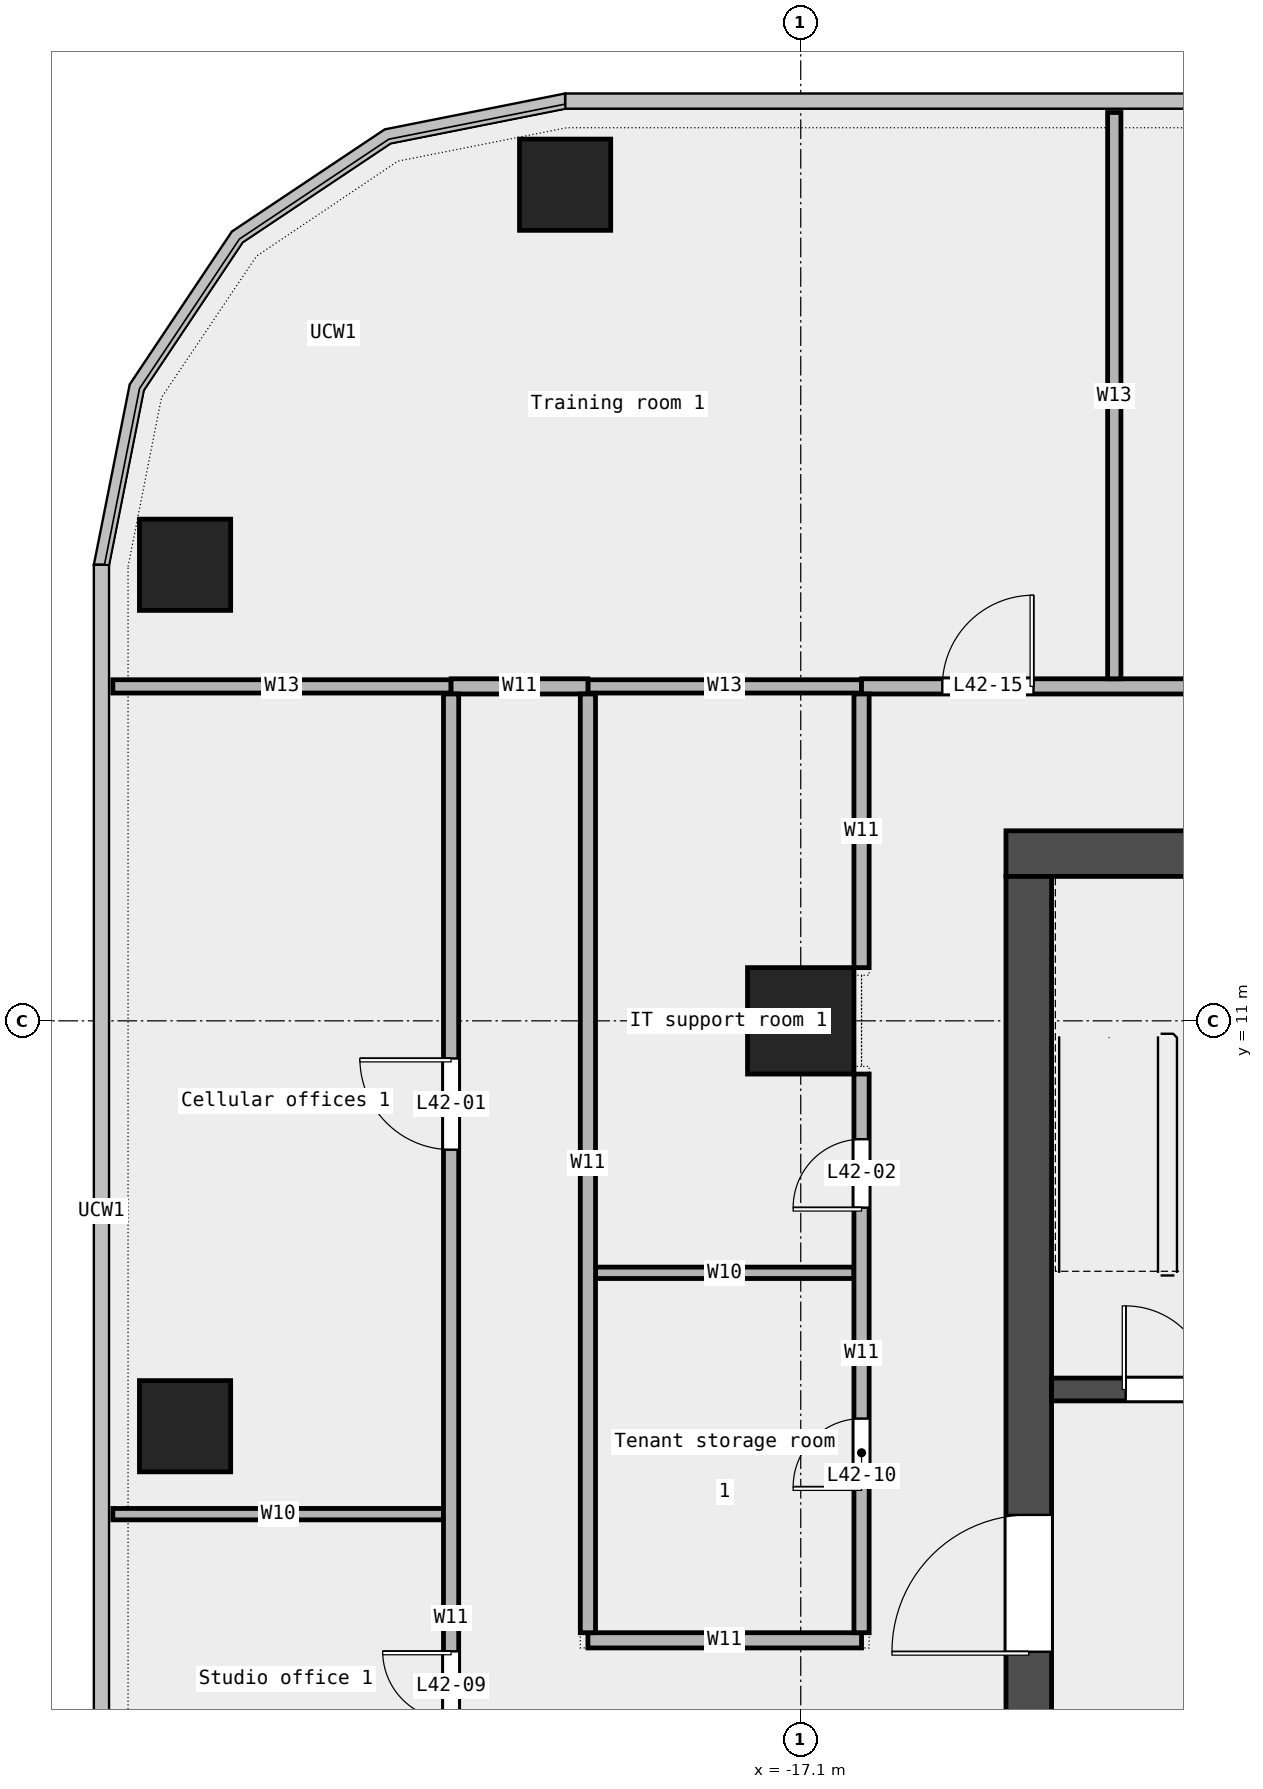
"""IFC4 building model, lengths in metres.
Left out: names, types, materials, properties, quantities, classifications, styles, units other than length and angle.
Written with IfcOpenShell. Run it as: python <this file> out.ifc"""

import sys

from ifc_helpers import new_model, si_unit, direction, frame, frame_2d, origin, origin_2d, place, context, subcontext, project, spatial, rectangle, extrude, element, fill, save


model = new_model("IFC4")
c1 = context("Model", 3, precision=1e-05, world=origin(), true_north=direction((0.0, 1.0)))
c2 = subcontext(c1, "Body", "Model", "MODEL_VIEW")
j1 = project(units=[si_unit("LENGTHUNIT", "METRE"), si_unit("PLANEANGLEUNIT", "RADIAN")], contexts=[c1])
p1 = place(None, origin())
s1 = spatial("IfcSite", under=j1, at=p1, CompositionType="ELEMENT")
p2 = place(p1, origin())
s2 = spatial("IfcBuilding", under=s1, at=p2, CompositionType="ELEMENT")
p3 = place(p2, frame((0.0, 0.0, 201.0)))
s3 = spatial("IfcBuildingStorey", under=s2, at=p3, CompositionType="ELEMENT", Elevation=201.0)
for number, where, z_axis, x_axis in (
    (1, (-20.2, 22.0, 0.0), (0.0, 0.0, 1.0), (1.0, 0.0, 0.0)),
    (2, (-25.2, 17.0, 0.0), (0.0, 0.0, 1.0), (1.0, 0.0, 0.0)),
    (3, (-25.2, 5.667, 0.0), (0.0, 0.0, 1.0), (1.0, 0.0, 0.0)),
):
    element("IfcColumn", number, at=place(p3, frame(where, z_axis=z_axis, x_axis=x_axis)), inside=s3, PredefinedType="COLUMN", context=c2, shape_type="SweptSolid", body=[
        extrude(rectangle(XDim=1.2, YDim=1.2, at=origin_2d()), origin(), (0.0, 0.0, 1.0), 3.4),
    ])
p4 = place(p3, frame((-17.1, 11.0, 0.0), z_axis=(0.0, 0.0, 1.0), x_axis=(1.0, 0.0, 0.0)))
e4 = element("IfcColumn", 4, at=p4, inside=s3, PredefinedType="COLUMN", context=c2, shape_type="SweptSolid", body=[
    extrude(rectangle(XDim=1.4, YDim=1.4, at=origin_2d()), origin(), (0.0, 0.0, 1.0), 3.4),
])
p5 = place(p3, frame((-19.9, 2.85, 0.0), z_axis=(0.0, 0.0, 1.0), x_axis=(1.0, 0.0, 0.0)))
e5 = element("IfcWall", 5, at=p5, inside=s3, PredefinedType="PARTITIONING", context=c2, shape_type="SweptSolid", body=[
    extrude(rectangle(XDim=3.6, YDim=0.2, at=frame_2d((1.8, 0.0))), origin(), (0.0, 0.0, 1.0), 3.4),
])
p6 = place(p3, frame((-26.15, 4.51, 0.0), z_axis=(0.0, 0.0, 1.0), x_axis=(1.0, 0.0, 0.0)))
e6 = element("IfcWall", 6, at=p6, inside=s3, PredefinedType="PARTITIONING", context=c2, shape_type="SweptSolid", body=[
    extrude(rectangle(XDim=4.35, YDim=0.15, at=frame_2d((2.175, 0.0))), origin(), (0.0, 0.0, 1.0), 3.4),
])
p7 = place(p3, frame((-19.8, 7.685, 0.0), z_axis=(0.0, 0.0, 1.0), x_axis=(1.0, 0.0, 0.0)))
e7 = element("IfcWall", 7, at=p7, inside=s3, PredefinedType="PARTITIONING", context=c2, shape_type="SweptSolid", body=[
    extrude(rectangle(XDim=3.4, YDim=0.15, at=frame_2d((1.7, 0.0))), origin(), (0.0, 0.0, 1.0), 3.4),
])
p8 = place(p3, frame((-26.15, 15.4, 0.0), z_axis=(0.0, 0.0, 1.0), x_axis=(1.0, 0.0, 0.0)))
e8 = element("IfcWall", 8, at=p8, inside=s3, PredefinedType="PARTITIONING", context=c2, shape_type="SweptSolid", body=[
    extrude(rectangle(XDim=4.45, YDim=0.175, at=frame_2d((2.225, 0.0))), origin(), (0.0, 0.0, 1.0), 3.4),
])
p9 = place(p3, frame((-19.9, 15.4, 0.0), z_axis=(0.0, 0.0, 1.0), x_axis=(1.0, 0.0, 0.0)))
e9 = element("IfcWall", 9, at=p9, inside=s3, PredefinedType="PARTITIONING", context=c2, shape_type="SweptSolid", body=[
    extrude(rectangle(XDim=3.6, YDim=0.175, at=frame_2d((1.8, 0.0))), origin(), (0.0, 0.0, 1.0), 3.4),
])
p10 = place(p3, frame((-21.7, 15.4, 0.0), z_axis=(0.0, 0.0, 1.0), x_axis=(1.0, 0.0, 0.0)))
e10 = element("IfcWall", 10, at=p10, inside=s3, PredefinedType="PARTITIONING", context=c2, shape_type="SweptSolid", body=[
    extrude(rectangle(XDim=1.8, YDim=0.2, at=frame_2d((0.9, 0.0))), origin(), (0.0, 0.0, 1.0), 3.4),
])
p11 = place(p3, frame((-16.3, 15.4, 0.0), z_axis=(0.0, 0.0, 1.0), x_axis=(1.0, 0.0, 0.0)))
e11 = element("IfcWall", 11, at=p11, inside=s3, PredefinedType="PARTITIONING", context=c2, shape_type="SweptSolid", body=[
    extrude(rectangle(XDim=32.6, YDim=0.2, at=frame_2d((16.3, 0.0))), origin(), (0.0, 0.0, 1.0), 3.4),
])
p12 = place(p11, frame((10.185, 0.0, 0.0)))
e12 = element("IfcOpeningElement", 12, at=p12, cuts=e11, PredefinedType="OPENING", context=c2, shape_type="SweptSolid", body=[
    extrude(rectangle(XDim=1.5, YDim=2.1, at=frame_2d((0.75, 1.05))), frame((0.0, 0.112, 0.0), z_axis=(0.0, -1.0, 0.0), x_axis=(1.0, 0.0, 0.0)), (0.0, 0.0, 1.0), 0.224),
])
p13 = place(p11, frame((1.062, 0.0, 0.0)))
e13 = element("IfcOpeningElement", 13, at=p13, cuts=e11, PredefinedType="OPENING", context=c2, shape_type="SweptSolid", body=[
    extrude(rectangle(XDim=1.2, YDim=2.1, at=frame_2d((0.6, 1.05))), frame((0.0, 0.112, 0.0), z_axis=(0.0, -1.0, 0.0), x_axis=(1.0, 0.0, 0.0)), (0.0, 0.0, 1.0), 0.224),
])
p14 = place(p11, frame((24.677, 0.0, 0.0)))
e14 = element("IfcOpeningElement", 14, at=p14, cuts=e11, PredefinedType="OPENING", context=c2, shape_type="SweptSolid", body=[
    extrude(rectangle(XDim=1.2, YDim=2.1, at=frame_2d((0.6, 1.05))), frame((0.0, 0.112, 0.0), z_axis=(0.0, -1.0, 0.0), x_axis=(1.0, 0.0, 0.0)), (0.0, 0.0, 1.0), 0.224),
])
p15 = place(p3, frame((-21.7, -9.0, 0.0), z_axis=(0.0, 0.0, 1.0), x_axis=(0.0, 1.0, 0.0)))
e15 = element("IfcWall", 15, at=p15, inside=s3, PredefinedType="PARTITIONING", context=c2, shape_type="SweptSolid", body=[
    extrude(rectangle(XDim=24.3, YDim=0.2, at=frame_2d((12.15, 0.0))), origin(), (0.0, 0.0, 1.0), 3.4),
])
p16 = place(p15, frame((18.305, 0.0, 0.0)))
e16 = element("IfcOpeningElement", 16, at=p16, cuts=e15, PredefinedType="OPENING", context=c2, shape_type="SweptSolid", body=[
    extrude(rectangle(XDim=1.2, YDim=2.1, at=frame_2d((0.6, 1.05))), frame((0.0, 0.112, 0.0), z_axis=(0.0, -1.0, 0.0), x_axis=(1.0, 0.0, 0.0)), (0.0, 0.0, 1.0), 0.224),
])
p17 = place(p15, frame((10.805, 0.0, 0.0)))
e17 = element("IfcOpeningElement", 17, at=p17, cuts=e15, PredefinedType="OPENING", context=c2, shape_type="SweptSolid", body=[
    extrude(rectangle(XDim=0.9, YDim=2.1, at=frame_2d((0.45, 1.05))), frame((0.0, 0.112, 0.0), z_axis=(0.0, -1.0, 0.0), x_axis=(1.0, 0.0, 0.0)), (0.0, 0.0, 1.0), 0.224),
])
p18 = place(p3, frame((-19.9, 2.95, 0.0), z_axis=(0.0, 0.0, 1.0), x_axis=(0.0, 1.0, 0.0)))
e18 = element("IfcWall", 18, at=p18, inside=s3, PredefinedType="PARTITIONING", context=c2, shape_type="SweptSolid", body=[
    extrude(rectangle(XDim=12.35, YDim=0.2, at=frame_2d((6.175, 0.0))), origin(), (0.0, 0.0, 1.0), 3.4),
])
p19 = place(p3, frame((-16.3, 2.95, 0.0), z_axis=(0.0, 0.0, 1.0), x_axis=(0.0, 1.0, 0.0)))
e19 = element("IfcWall", 19, at=p19, inside=s3, PredefinedType="PARTITIONING", context=c2, shape_type="SweptSolid", body=[
    extrude(rectangle(XDim=7.35, YDim=0.2, at=frame_2d((3.675, 0.0))), origin(), (0.0, 0.0, 1.0), 3.4),
])
p20 = place(p19, frame((5.593, 0.0, 0.0)))
e20 = element("IfcOpeningElement", 20, at=p20, cuts=e19, PredefinedType="OPENING", context=c2, shape_type="SweptSolid", body=[
    extrude(rectangle(XDim=0.9, YDim=2.1, at=frame_2d((0.45, 1.05))), frame((0.0, 0.112, 0.0), z_axis=(0.0, -1.0, 0.0), x_axis=(1.0, 0.0, 0.0)), (0.0, 0.0, 1.0), 0.224),
])
p21 = place(p19, frame((1.917, 0.0, 0.0)))
e21 = element("IfcOpeningElement", 21, at=p21, cuts=e19, PredefinedType="OPENING", context=c2, shape_type="SweptSolid", body=[
    extrude(rectangle(XDim=0.9, YDim=2.1, at=frame_2d((0.45, 1.05))), frame((0.0, 0.112, 0.0), z_axis=(0.0, -1.0, 0.0), x_axis=(1.0, 0.0, 0.0)), (0.0, 0.0, 1.0), 0.224),
])
p22 = place(p3, frame((-16.3, 11.7, 0.0), z_axis=(0.0, 0.0, 1.0), x_axis=(0.0, 1.0, 0.0)))
e22 = element("IfcWall", 22, at=p22, inside=s3, PredefinedType="PARTITIONING", context=c2, shape_type="SweptSolid", body=[
    extrude(rectangle(XDim=3.6, YDim=0.2, at=frame_2d((1.8, 0.0))), origin(), (0.0, 0.0, 1.0), 3.4),
])
p23 = place(p3, frame((-12.975, 15.5, 0.0), z_axis=(0.0, 0.0, 1.0), x_axis=(0.0, 1.0, 0.0)))
e23 = element("IfcWall", 23, at=p23, inside=s3, PredefinedType="PARTITIONING", context=c2, shape_type="SweptSolid", body=[
    extrude(rectangle(XDim=7.45, YDim=0.175, at=frame_2d((3.725, 0.0))), origin(), (0.0, 0.0, 1.0), 3.4),
])
p24 = place(p3, frame((-14.4, 13.2, 0.0), z_axis=(0.0, 0.0, 1.0), x_axis=(1.0, 0.0, 0.0)))
e24 = element("IfcWall", 24, at=p24, inside=s3, PredefinedType="SHEAR", context=c2, shape_type="SweptSolid", body=[
    extrude(rectangle(XDim=28.8, YDim=0.6, at=frame_2d((14.4, 0.0))), origin(), (0.0, 0.0, 1.0), 3.7),
])
p25 = place(p24, frame((6.775, 0.0, 0.0)))
e25 = element("IfcOpeningElement", 25, at=p25, cuts=e24, PredefinedType="OPENING", context=c2, shape_type="SweptSolid", body=[
    extrude(rectangle(XDim=1.0, YDim=2.1, at=frame_2d((0.5, 1.05))), frame((0.0, 0.312, 0.0), z_axis=(0.0, -1.0, 0.0), x_axis=(1.0, 0.0, 0.0)), (0.0, 0.0, 1.0), 0.624),
])
p26 = place(p24, frame((13.525, 0.0, 0.0)))
e26 = element("IfcOpeningElement", 26, at=p26, cuts=e24, PredefinedType="OPENING", context=c2, shape_type="SweptSolid", body=[
    extrude(rectangle(XDim=1.0, YDim=2.1, at=frame_2d((0.5, 1.05))), frame((0.0, 0.312, 0.0), z_axis=(0.0, -1.0, 0.0), x_axis=(1.0, 0.0, 0.0)), (0.0, 0.0, 1.0), 0.624),
])
p27 = place(p24, frame((20.65, 0.0, 0.0)))
e27 = element("IfcOpeningElement", 27, at=p27, cuts=e24, PredefinedType="OPENING", context=c2, shape_type="SweptSolid", body=[
    extrude(rectangle(XDim=1.0, YDim=2.1, at=frame_2d((0.5, 1.05))), frame((0.0, 0.312, 0.0), z_axis=(0.0, -1.0, 0.0), x_axis=(1.0, 0.0, 0.0)), (0.0, 0.0, 1.0), 0.624),
])
p28 = place(p3, frame((-14.1, -6.6, 0.0), z_axis=(0.0, 0.0, 1.0), x_axis=(0.0, 1.0, 0.0)))
e28 = element("IfcWall", 28, at=p28, inside=s3, PredefinedType="SHEAR", context=c2, shape_type="SweptSolid", body=[
    extrude(rectangle(XDim=19.5, YDim=0.6, at=frame_2d((9.75, 0.0))), origin(), (0.0, 0.0, 1.0), 3.7),
])
p29 = place(p28, frame((9.3, 0.0, 0.0)))
e29 = element("IfcOpeningElement", 29, at=p29, cuts=e28, PredefinedType="OPENING", context=c2, shape_type="SweptSolid", body=[
    extrude(rectangle(XDim=1.8, YDim=2.1, at=frame_2d((0.9, 1.05))), frame((0.0, 0.312, 0.0), z_axis=(0.0, -1.0, 0.0), x_axis=(1.0, 0.0, 0.0)), (0.0, 0.0, 1.0), 0.624),
])
p30 = place(p3, frame((-13.8, 6.15, 0.0), z_axis=(0.0, 0.0, 1.0), x_axis=(1.0, 0.0, 0.0)))
e30 = element("IfcWall", 30, at=p30, inside=s3, PredefinedType="SOLIDWALL", context=c2, shape_type="SweptSolid", body=[
    extrude(rectangle(XDim=3.15, YDim=0.3, at=frame_2d((1.575, 0.0))), origin(), (0.0, 0.0, 1.0), 3.7),
])
p31 = place(p30, frame((0.975, 0.0, 0.0)))
e31 = element("IfcOpeningElement", 31, at=p31, cuts=e30, PredefinedType="OPENING", context=c2, shape_type="SweptSolid", body=[
    extrude(rectangle(XDim=1.1, YDim=2.1, at=frame_2d((0.55, 1.05))), frame((0.0, 0.162, 0.0), z_axis=(0.0, -1.0, 0.0), x_axis=(1.0, 0.0, 0.0)), (0.0, 0.0, 1.0), 0.324),
])
p32 = place(p16, origin())
e32 = element("IfcDoor", 32, at=p32, inside=s3, OperationType="SINGLE_SWING_RIGHT", PredefinedType="DOOR", context=c2, shape_type="SweptSolid", body=[
    extrude(rectangle(XDim=1.2, YDim=2.1, at=frame_2d((0.6, 1.05))), frame((0.0, 0.025, 0.0), z_axis=(0.0, -1.0, 0.0), x_axis=(1.0, 0.0, 0.0)), (0.0, 0.0, 1.0), 0.05),
])
fill(e16, e32)
p33 = place(p20, origin())
e33 = element("IfcDoor", 33, at=p33, inside=s3, OperationType="SINGLE_SWING_LEFT", PredefinedType="DOOR", context=c2, shape_type="SweptSolid", body=[
    extrude(rectangle(XDim=0.9, YDim=2.1, at=frame_2d((0.45, 1.05))), frame((0.0, 0.025, 0.0), z_axis=(0.0, -1.0, 0.0), x_axis=(1.0, 0.0, 0.0)), (0.0, 0.0, 1.0), 0.05),
])
fill(e20, e33)
p34 = place(p17, origin())
e34 = element("IfcDoor", 34, at=p34, inside=s3, OperationType="SINGLE_SWING_RIGHT", PredefinedType="DOOR", context=c2, shape_type="SweptSolid", body=[
    extrude(rectangle(XDim=0.9, YDim=2.1, at=frame_2d((0.45, 1.05))), frame((0.0, 0.025, 0.0), z_axis=(0.0, -1.0, 0.0), x_axis=(1.0, 0.0, 0.0)), (0.0, 0.0, 1.0), 0.05),
])
fill(e17, e34)
p35 = place(p21, origin())
e35 = element("IfcDoor", 35, at=p35, inside=s3, OperationType="SINGLE_SWING_LEFT", PredefinedType="DOOR", context=c2, shape_type="SweptSolid", body=[
    extrude(rectangle(XDim=0.9, YDim=2.1, at=frame_2d((0.45, 1.05))), frame((0.0, 0.025, 0.0), z_axis=(0.0, -1.0, 0.0), x_axis=(1.0, 0.0, 0.0)), (0.0, 0.0, 1.0), 0.05),
])
fill(e21, e35)
p36 = place(p13, origin())
e36 = element("IfcDoor", 36, at=p36, inside=s3, OperationType="SINGLE_SWING_RIGHT", PredefinedType="DOOR", context=c2, shape_type="SweptSolid", body=[
    extrude(rectangle(XDim=1.2, YDim=2.1, at=frame_2d((0.6, 1.05))), frame((0.0, 0.025, 0.0), z_axis=(0.0, -1.0, 0.0), x_axis=(1.0, 0.0, 0.0)), (0.0, 0.0, 1.0), 0.05),
])
fill(e13, e36)
p37 = place(p31, origin())
e37 = element("IfcDoor", 37, at=p37, inside=s3, OperationType="SINGLE_SWING_LEFT", PredefinedType="DOOR", context=c2, shape_type="SweptSolid", body=[
    extrude(rectangle(XDim=1.1, YDim=2.1, at=frame_2d((0.55, 1.05))), frame((0.0, 0.025, 0.0), z_axis=(0.0, -1.0, 0.0), x_axis=(1.0, 0.0, 0.0)), (0.0, 0.0, 1.0), 0.05),
])
fill(e31, e37)
p38 = place(p29, origin())
e38 = element("IfcDoor", 38, at=p38, inside=s3, OperationType="DOUBLE_DOOR_SINGLE_SWING", PredefinedType="DOOR", context=c2, shape_type="SweptSolid", body=[
    extrude(rectangle(XDim=1.8, YDim=2.1, at=frame_2d((0.9, 1.05))), frame((0.0, 0.025, 0.0), z_axis=(0.0, -1.0, 0.0), x_axis=(1.0, 0.0, 0.0)), (0.0, 0.0, 1.0), 0.05),
])
fill(e29, e38)
save(model, sys.argv[1])
